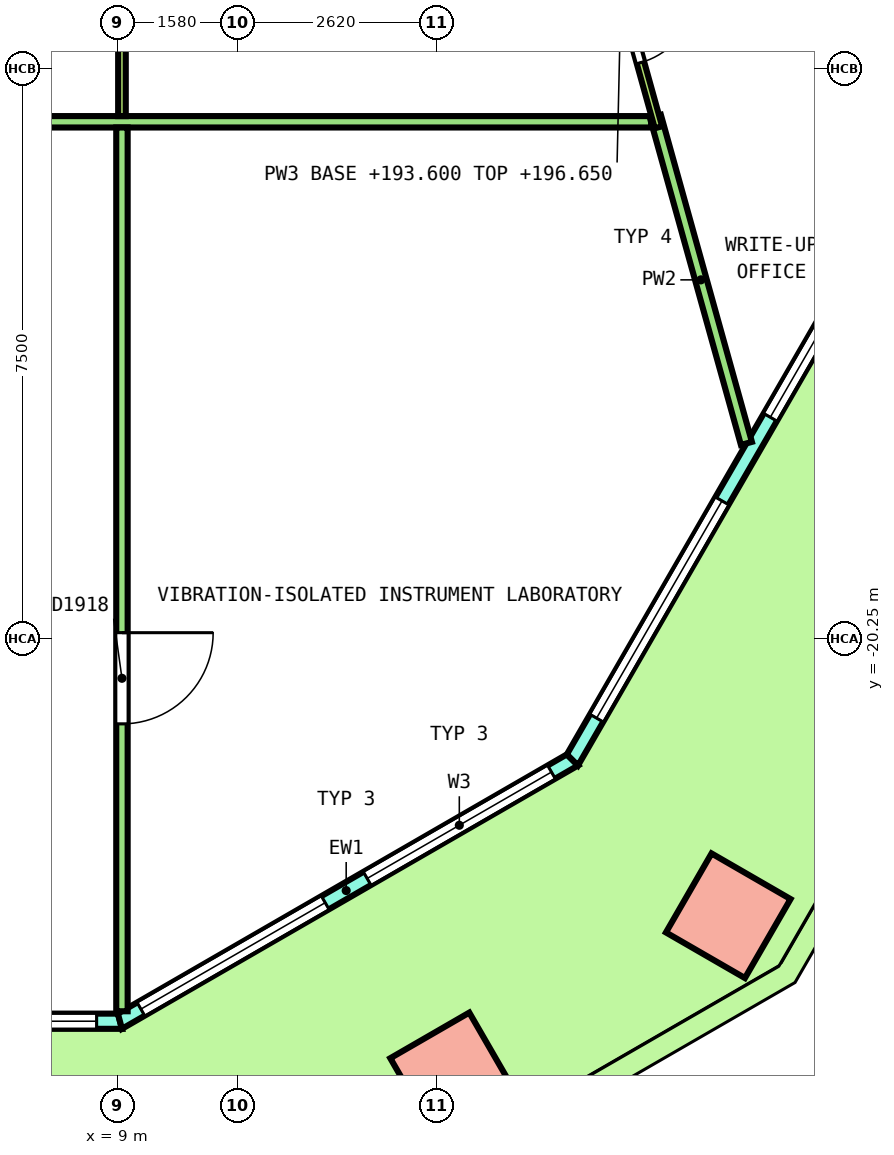
"""IFC4 building model, lengths in metres.
Left out: names, types, materials, properties, quantities, classifications, styles, units other than length and angle.
Written with IfcOpenShell. Run it as: python <this file> out.ifc"""

import sys

from ifc_helpers import new_model, si_unit, direction, frame, frame_2d, origin, origin_2d, place, context, subcontext, project, spatial, polyline, rectangle, outline, extrude, element, fill, save


model = new_model("IFC4")
c1 = context("Model", 3, precision=1e-05, world=origin(), true_north=direction((0.0, 1.0)))
c2 = subcontext(c1, "Body", "Model", "MODEL_VIEW")
j1 = project(units=[si_unit("LENGTHUNIT", "METRE"), si_unit("PLANEANGLEUNIT", "RADIAN")], contexts=[c1])
p1 = place(None, origin())
s1 = spatial("IfcSite", under=j1, at=p1, CompositionType="ELEMENT")
p2 = place(p1, origin())
s2 = spatial("IfcBuilding", under=s1, at=p2, CompositionType="ELEMENT")
p3 = place(p2, frame((0.0, 0.0, 193.6)))
s3 = spatial("IfcBuildingStorey", under=s2, at=p3, CompositionType="ELEMENT", Elevation=193.6)
for number, where, z_axis, x_axis in (
    (1, (13.408, -25.989, 0.0), (0.0, 0.0, 1.0), (0.866, 0.5, 0.0)),
    (2, (17.035, -23.895, 0.0), (0.0, 0.0, 1.0), (0.5, 0.866, 0.0)),
):
    element("IfcColumn", number, at=place(p3, frame(where, z_axis=z_axis, x_axis=x_axis)), inside=s3, PredefinedType="COLUMN", context=c2, shape_type="SweptSolid", body=[
        extrude(rectangle(XDim=1.2, YDim=1.2, at=origin_2d()), origin(), (0.0, 0.0, 1.0), 4.04),
    ])
p4 = place(p3, frame((-9.031, -25.283, 0.0), z_axis=(0.0, 0.0, 1.0), x_axis=(1.0, 0.0, 0.0)))
e3 = element("IfcWall", 3, at=p4, inside=s3, PredefinedType="SOLIDWALL", context=c2, shape_type="SweptSolid", body=[
    extrude(outline(polyline([(-0.027, -0.1), (0.979, -0.1), (1.986, -0.1), (2.992, -0.1), (3.999, -0.1), (5.005, -0.1), (6.012, -0.1), (7.018, -0.1), (8.025, -0.1), (9.031, -0.1), (10.038, -0.1), (11.044, -0.1), (12.051, -0.1), (13.057, -0.1), (14.063, -0.1), (15.07, -0.1), (16.076, -0.1), (17.083, -0.1), (18.089, -0.1), (18.036, 0.1), (17.035, 0.1), (16.035, 0.1), (15.034, 0.1), (14.034, 0.1), (13.033, 0.1), (12.033, 0.1), (11.032, 0.1), (10.032, 0.1), (9.031, 0.1), (8.031, 0.1), (7.03, 0.1), (6.03, 0.1), (5.029, 0.1), (4.029, 0.1), (3.028, 0.1), (2.028, 0.1), (1.027, 0.1), (0.027, 0.1), (-0.027, -0.1)])), origin(), (0.0, 0.0, 1.0), 4.1),
])
p5 = place(p4, frame((0.306, 0.0, 0.1)))
e4 = element("IfcOpeningElement", 4, at=p5, cuts=e3, PredefinedType="OPENING", context=c2, shape_type="SweptSolid", body=[
    extrude(rectangle(XDim=3.0, YDim=2.9, at=frame_2d((1.5, 1.45))), frame((0.0, 0.11, 0.0), z_axis=(0.0, -1.0, 0.0), x_axis=(1.0, 0.0, 0.0)), (0.0, 0.0, 1.0), 0.22),
])
p6 = place(p4, frame((3.919, 0.0, 0.1)))
e5 = element("IfcOpeningElement", 5, at=p6, cuts=e3, PredefinedType="OPENING", context=c2, shape_type="SweptSolid", body=[
    extrude(rectangle(XDim=3.0, YDim=2.9, at=frame_2d((1.5, 1.45))), frame((0.0, 0.11, 0.0), z_axis=(0.0, -1.0, 0.0), x_axis=(1.0, 0.0, 0.0)), (0.0, 0.0, 1.0), 0.22),
])
p7 = place(p4, frame((8.131, 0.0, 0.0)))
e6 = element("IfcOpeningElement", 6, at=p7, cuts=e3, PredefinedType="OPENING", context=c2, shape_type="SweptSolid", body=[
    extrude(rectangle(XDim=1.8, YDim=2.4, at=frame_2d((0.9, 1.2))), frame((0.0, 0.11, 0.0), z_axis=(0.0, -1.0, 0.0), x_axis=(1.0, 0.0, 0.0)), (0.0, 0.0, 1.0), 0.22),
])
p8 = place(p4, frame((8.131, 0.0, 2.55)))
e7 = element("IfcOpeningElement", 7, at=p8, cuts=e3, PredefinedType="OPENING", context=c2, shape_type="SweptSolid", body=[
    extrude(rectangle(XDim=1.8, YDim=0.45, at=frame_2d((0.9, 0.225))), frame((0.0, 0.11, 0.0), z_axis=(0.0, -1.0, 0.0), x_axis=(1.0, 0.0, 0.0)), (0.0, 0.0, 1.0), 0.22),
])
p9 = place(p4, frame((11.144, 0.0, 0.1)))
e8 = element("IfcOpeningElement", 8, at=p9, cuts=e3, PredefinedType="OPENING", context=c2, shape_type="SweptSolid", body=[
    extrude(rectangle(XDim=3.0, YDim=2.9, at=frame_2d((1.5, 1.45))), frame((0.0, 0.11, 0.0), z_axis=(0.0, -1.0, 0.0), x_axis=(1.0, 0.0, 0.0)), (0.0, 0.0, 1.0), 0.22),
])
p10 = place(p4, frame((14.756, 0.0, 0.1)))
e9 = element("IfcOpeningElement", 9, at=p10, cuts=e3, PredefinedType="OPENING", context=c2, shape_type="SweptSolid", body=[
    extrude(rectangle(XDim=3.0, YDim=2.9, at=frame_2d((1.5, 1.45))), frame((0.0, 0.11, 0.0), z_axis=(0.0, -1.0, 0.0), x_axis=(1.0, 0.0, 0.0)), (0.0, 0.0, 1.0), 0.22),
])
p11 = place(p3, frame((9.031, -25.283, 0.0), z_axis=(0.0, 0.0, 1.0), x_axis=(0.866029458321, 0.49999297727, 0.0)))
e10 = element("IfcWall", 10, at=p11, inside=s3, PredefinedType="SOLIDWALL", context=c2, shape_type="SweptSolid", body=[
    extrude(outline(polyline([(-0.027, -0.1), (1.128, -0.1), (2.282, -0.1), (3.437, -0.1), (4.592, -0.1), (5.747, -0.1), (6.901, -0.1), (6.848, 0.1), (5.711, 0.1), (4.574, 0.1), (3.437, 0.1), (2.301, 0.1), (1.164, 0.1), (0.027, 0.1), (-0.027, -0.1)])), origin(), (0.0, 0.0, 1.0), 4.1),
])
p12 = place(p11, frame((0.319, 0.0, 0.1)))
e11 = element("IfcOpeningElement", 11, at=p12, cuts=e10, PredefinedType="OPENING", context=c2, shape_type="SweptSolid", body=[
    extrude(rectangle(XDim=2.8, YDim=2.9, at=frame_2d((1.4, 1.45))), frame((0.0, 0.11, 0.0), z_axis=(0.0, -1.0, 0.0), x_axis=(1.0, 0.0, 0.0)), (0.0, 0.0, 1.0), 0.22),
])
p13 = place(p11, frame((3.756, 0.0, 0.1)))
e12 = element("IfcOpeningElement", 12, at=p13, cuts=e10, PredefinedType="OPENING", context=c2, shape_type="SweptSolid", body=[
    extrude(rectangle(XDim=2.8, YDim=2.9, at=frame_2d((1.4, 1.45))), frame((0.0, 0.11, 0.0), z_axis=(0.0, -1.0, 0.0), x_axis=(1.0, 0.0, 0.0)), (0.0, 0.0, 1.0), 0.22),
])
p14 = place(p3, frame((14.985, -21.845, 0.0), z_axis=(0.0, 0.0, 1.0), x_axis=(0.50000204422, 0.86602422355, 0.0)))
e13 = element("IfcWall", 13, at=p14, inside=s3, PredefinedType="SOLIDWALL", context=c2, shape_type="SweptSolid", body=[
    extrude(outline(polyline([(-0.027, -0.1), (1.014, -0.1), (2.055, -0.1), (3.097, -0.1), (4.138, -0.1), (5.179, -0.1), (6.22, -0.1), (7.261, -0.1), (8.303, -0.1), (9.344, -0.1), (10.385, -0.1), (11.426, -0.1), (12.468, -0.1), (13.509, -0.1), (14.55, -0.1), (15.591, -0.1), (16.632, -0.1), (17.673, -0.1), (18.715, -0.1), (19.756, -0.1), (20.797, -0.1), (21.838, -0.1), (22.879, -0.1), (22.826, 0.1), (21.789, 0.1), (20.753, 0.1), (19.717, 0.1), (18.68, 0.1), (17.644, 0.1), (16.608, 0.1), (15.572, 0.1), (14.535, 0.1), (13.499, 0.1), (12.463, 0.1), (11.426, 0.1), (10.39, 0.1), (9.354, 0.1), (8.317, 0.1), (7.281, 0.1), (6.245, 0.1), (5.208, 0.1), (4.172, 0.1), (3.136, 0.1), (2.099, 0.1), (1.063, 0.1), (0.027, 0.1), (-0.027, -0.1)])), origin(), (0.0, 0.0, 1.0), 4.1),
])
p15 = place(p14, frame((0.635, 0.0, 0.1)))
e14 = element("IfcOpeningElement", 14, at=p15, cuts=e13, PredefinedType="OPENING", context=c2, shape_type="SweptSolid", body=[
    extrude(rectangle(XDim=3.3, YDim=2.9, at=frame_2d((1.65, 1.45))), frame((0.0, 0.11, 0.0), z_axis=(0.0, -1.0, 0.0), x_axis=(1.0, 0.0, 0.0)), (0.0, 0.0, 1.0), 0.22),
])
p16 = place(p14, frame((5.206, 0.0, 0.1)))
e15 = element("IfcOpeningElement", 15, at=p16, cuts=e13, PredefinedType="OPENING", context=c2, shape_type="SweptSolid", body=[
    extrude(rectangle(XDim=3.3, YDim=2.9, at=frame_2d((1.65, 1.45))), frame((0.0, 0.11, 0.0), z_axis=(0.0, -1.0, 0.0), x_axis=(1.0, 0.0, 0.0)), (0.0, 0.0, 1.0), 0.22),
])
p17 = place(p14, frame((10.526, 0.0, 0.0)))
e16 = element("IfcOpeningElement", 16, at=p17, cuts=e13, PredefinedType="OPENING", context=c2, shape_type="SweptSolid", body=[
    extrude(rectangle(XDim=1.8, YDim=2.4, at=frame_2d((0.9, 1.2))), frame((0.0, 0.11, 0.0), z_axis=(0.0, -1.0, 0.0), x_axis=(1.0, 0.0, 0.0)), (0.0, 0.0, 1.0), 0.22),
])
p18 = place(p14, frame((10.526, 0.0, 2.55)))
e17 = element("IfcOpeningElement", 17, at=p18, cuts=e13, PredefinedType="OPENING", context=c2, shape_type="SweptSolid", body=[
    extrude(rectangle(XDim=1.8, YDim=0.45, at=frame_2d((0.9, 0.225))), frame((0.0, 0.11, 0.0), z_axis=(0.0, -1.0, 0.0), x_axis=(1.0, 0.0, 0.0)), (0.0, 0.0, 1.0), 0.22),
])
p19 = place(p14, frame((14.347, 0.0, 0.1)))
e18 = element("IfcOpeningElement", 18, at=p19, cuts=e13, PredefinedType="OPENING", context=c2, shape_type="SweptSolid", body=[
    extrude(rectangle(XDim=3.3, YDim=2.9, at=frame_2d((1.65, 1.45))), frame((0.0, 0.11, 0.0), z_axis=(0.0, -1.0, 0.0), x_axis=(1.0, 0.0, 0.0)), (0.0, 0.0, 1.0), 0.22),
])
p20 = place(p14, frame((18.917, 0.0, 0.1)))
e19 = element("IfcOpeningElement", 19, at=p20, cuts=e13, PredefinedType="OPENING", context=c2, shape_type="SweptSolid", body=[
    extrude(rectangle(XDim=3.3, YDim=2.9, at=frame_2d((1.65, 1.45))), frame((0.0, 0.11, 0.0), z_axis=(0.0, -1.0, 0.0), x_axis=(1.0, 0.0, 0.0)), (0.0, 0.0, 1.0), 0.22),
])
p21 = place(p3, frame((-14.983, -13.45, 0.0), z_axis=(0.0, 0.0, 1.0), x_axis=(1.0, 0.0, 0.0)))
e20 = element("IfcWall", 20, at=p21, inside=s3, PredefinedType="PARTITIONING", context=c2, shape_type="SweptSolid", body=[
    extrude(rectangle(XDim=31.004, YDim=0.15, at=frame_2d((15.502, 0.0))), origin(), (0.0, 0.0, 1.0), 3.05),
])
p22 = place(p21, frame((1.3, 0.0, 0.0)))
e21 = element("IfcOpeningElement", 21, at=p22, cuts=e20, PredefinedType="OPENING", context=c2, shape_type="SweptSolid", body=[
    extrude(rectangle(XDim=1.2, YDim=2.1, at=frame_2d((0.6, 1.05))), frame((0.0, 0.085, 0.0), z_axis=(0.0, -1.0, 0.0), x_axis=(1.0, 0.0, 0.0)), (0.0, 0.0, 1.0), 0.17),
])
p23 = place(p3, frame((9.058, -25.152, 0.0), z_axis=(0.0, 0.0, 1.0), x_axis=(0.0, 1.0, 0.0)))
e22 = element("IfcWall", 22, at=p23, inside=s3, PredefinedType="PARTITIONING", context=c2, shape_type="SweptSolid", body=[
    extrude(rectangle(XDim=11.627, YDim=0.15, at=frame_2d((5.813, 0.0))), origin(), (0.0, 0.0, 1.0), 3.05),
])
p24 = place(p23, frame((3.781, 0.0, 0.0)))
e23 = element("IfcOpeningElement", 23, at=p24, cuts=e22, PredefinedType="OPENING", context=c2, shape_type="SweptSolid", body=[
    extrude(rectangle(XDim=1.2, YDim=2.1, at=frame_2d((0.6, 1.05))), frame((0.0, 0.085, 0.0), z_axis=(0.0, -1.0, 0.0), x_axis=(1.0, 0.0, 0.0)), (0.0, 0.0, 1.0), 0.17),
])
p25 = place(p3, frame((16.076, -13.378, 0.0), z_axis=(0.0, 0.0, 1.0), x_axis=(0.268117368294, -0.963386255257, 0.0)))
e24 = element("IfcWall", 24, at=p25, inside=s3, PredefinedType="PARTITIONING", context=c2, shape_type="SweptSolid", body=[
    extrude(rectangle(XDim=4.467, YDim=0.15, at=frame_2d((2.234, 0.0))), origin(), (0.0, 0.0, 1.0), 3.05),
])
p26 = place(p3, frame((9.058, -13.375, 0.0), z_axis=(0.0, 0.0, 1.0), x_axis=(0.0, 1.0, 0.0)))
e25 = element("IfcWall", 25, at=p26, inside=s3, PredefinedType="PARTITIONING", context=c2, shape_type="SweptSolid", body=[
    extrude(rectangle(XDim=3.25, YDim=0.1, at=frame_2d((1.625, 0.0))), origin(), (0.0, 0.0, 1.0), 3.05),
])
p27 = place(p3, frame((15.13, -9.978, 0.0), z_axis=(0.0, 0.0, 1.0), x_axis=(0.268088761136, -0.963394216379, 0.0)))
e26 = element("IfcWall", 26, at=p27, inside=s3, PredefinedType="PARTITIONING", context=c2, shape_type="SweptSolid", body=[
    extrude(rectangle(XDim=3.679, YDim=0.1, at=frame_2d((1.84, 0.0))), origin(), (0.0, 0.0, 1.0), 3.05),
])
p28 = place(p27, frame((1.797, 0.0, 0.0)))
e27 = element("IfcOpeningElement", 27, at=p28, cuts=e26, PredefinedType="OPENING", context=c2, shape_type="SweptSolid", body=[
    extrude(rectangle(XDim=1.0, YDim=2.1, at=frame_2d((0.5, 1.05))), frame((0.0, 0.06, 0.0), z_axis=(0.0, -1.0, 0.0), x_axis=(1.0, 0.0, 0.0)), (0.0, 0.0, 1.0), 0.12),
])
p29 = place(p10, origin())
e28 = element("IfcWindow", 28, at=p29, inside=s3, PartitioningType="SINGLE_PANEL", PredefinedType="WINDOW", context=c2, shape_type="SweptSolid", body=[
    extrude(rectangle(XDim=3.0, YDim=2.9, at=frame_2d((1.5, 1.45))), frame((0.0, 0.03, 0.0), z_axis=(0.0, -1.0, 0.0), x_axis=(1.0, 0.0, 0.0)), (0.0, 0.0, 1.0), 0.06),
])
fill(e9, e28)
p30 = place(p12, origin())
e29 = element("IfcWindow", 29, at=p30, inside=s3, PartitioningType="SINGLE_PANEL", PredefinedType="WINDOW", context=c2, shape_type="SweptSolid", body=[
    extrude(rectangle(XDim=2.8, YDim=2.9, at=frame_2d((1.4, 1.45))), frame((0.0, 0.03, 0.0), z_axis=(0.0, -1.0, 0.0), x_axis=(1.0, 0.0, 0.0)), (0.0, 0.0, 1.0), 0.06),
])
fill(e11, e29)
p31 = place(p13, origin())
e30 = element("IfcWindow", 30, at=p31, inside=s3, PartitioningType="SINGLE_PANEL", PredefinedType="WINDOW", context=c2, shape_type="SweptSolid", body=[
    extrude(rectangle(XDim=2.8, YDim=2.9, at=frame_2d((1.4, 1.45))), frame((0.0, 0.03, 0.0), z_axis=(0.0, -1.0, 0.0), x_axis=(1.0, 0.0, 0.0)), (0.0, 0.0, 1.0), 0.06),
])
fill(e12, e30)
p32 = place(p15, origin())
e31 = element("IfcWindow", 31, at=p32, inside=s3, PartitioningType="SINGLE_PANEL", PredefinedType="WINDOW", context=c2, shape_type="SweptSolid", body=[
    extrude(rectangle(XDim=3.3, YDim=2.9, at=frame_2d((1.65, 1.45))), frame((0.0, 0.03, 0.0), z_axis=(0.0, -1.0, 0.0), x_axis=(1.0, 0.0, 0.0)), (0.0, 0.0, 1.0), 0.06),
])
fill(e14, e31)
p33 = place(p16, origin())
e32 = element("IfcWindow", 32, at=p33, inside=s3, PartitioningType="SINGLE_PANEL", PredefinedType="WINDOW", context=c2, shape_type="SweptSolid", body=[
    extrude(rectangle(XDim=3.3, YDim=2.9, at=frame_2d((1.65, 1.45))), frame((0.0, 0.03, 0.0), z_axis=(0.0, -1.0, 0.0), x_axis=(1.0, 0.0, 0.0)), (0.0, 0.0, 1.0), 0.06),
])
fill(e15, e32)
p34 = place(p24, origin())
e33 = element("IfcDoor", 33, at=p34, inside=s3, OperationType="DOUBLE_DOOR_SINGLE_SWING", PredefinedType="DOOR", context=c2, shape_type="SweptSolid", body=[
    extrude(rectangle(XDim=1.2, YDim=2.1, at=frame_2d((0.6, 1.05))), frame((0.0, 0.025, 0.0), z_axis=(0.0, -1.0, 0.0), x_axis=(1.0, 0.0, 0.0)), (0.0, 0.0, 1.0), 0.05),
])
fill(e23, e33)
p35 = place(p28, origin())
e34 = element("IfcDoor", 34, at=p35, inside=s3, OperationType="SINGLE_SWING_RIGHT", PredefinedType="DOOR", context=c2, shape_type="SweptSolid", body=[
    extrude(rectangle(XDim=1.0, YDim=2.1, at=frame_2d((0.5, 1.05))), frame((0.0, 0.025, 0.0), z_axis=(0.0, -1.0, 0.0), x_axis=(1.0, 0.0, 0.0)), (0.0, 0.0, 1.0), 0.05),
])
fill(e27, e34)
save(model, sys.argv[1])
